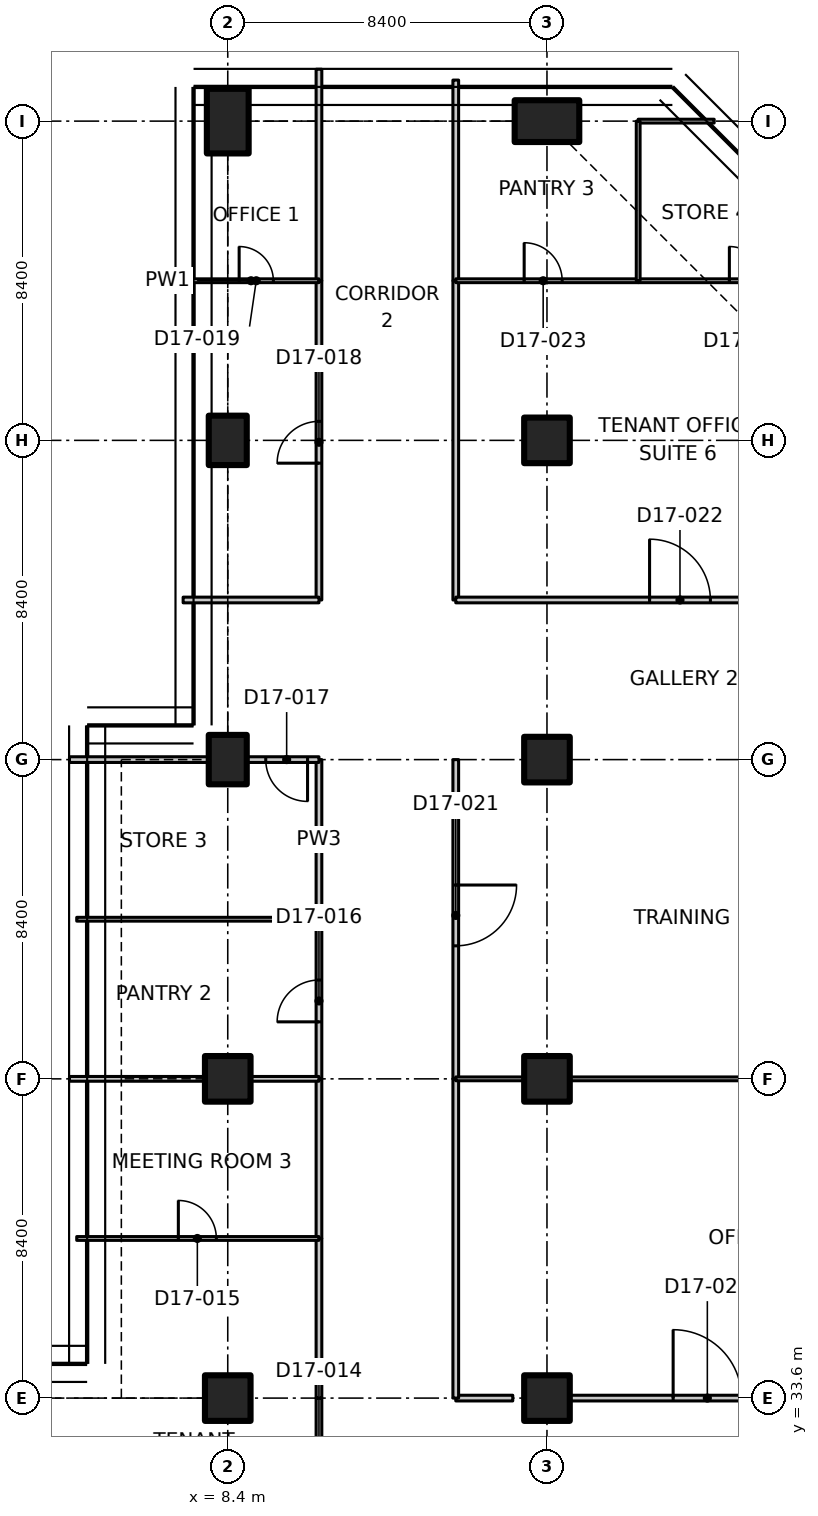
"""IFC4 building model, lengths in metres.
Left out: names, types, materials, properties, quantities, classifications, styles, units other than length and angle.
Written with IfcOpenShell. Run it as: python <this file> out.ifc"""

import sys

from ifc_helpers import new_model, si_unit, direction, frame, frame_2d, origin, origin_2d, place, context, subcontext, project, spatial, polyline, rectangle, outline, extrude, element, fill, save


model = new_model("IFC4")
c1 = context("Model", 3, precision=1e-05, world=origin(), true_north=direction((0.0, 1.0)))
c2 = subcontext(c1, "Body", "Model", "MODEL_VIEW")
j1 = project(units=[si_unit("LENGTHUNIT", "METRE"), si_unit("PLANEANGLEUNIT", "RADIAN")], contexts=[c1])
p1 = place(None, origin())
s1 = spatial("IfcSite", under=j1, at=p1, CompositionType="ELEMENT")
p2 = place(p1, origin())
s2 = spatial("IfcBuilding", under=s1, at=p2, CompositionType="ELEMENT")
p3 = place(p2, frame((0.0, 0.0, 142.1)))
s3 = spatial("IfcBuildingStorey", under=s2, at=p3, CompositionType="ELEMENT", Elevation=142.1)
for number, where, z_axis, x_axis in (
    (1, (8.4, 33.6, 0.0), (0.0, 0.0, 1.0), (1.0, 0.0, 0.0)),
    (2, (8.4, 42.0, 0.0), (0.0, 0.0, 1.0), (1.0, 0.0, 0.0)),
):
    element("IfcColumn", number, at=place(p3, frame(where, z_axis=z_axis, x_axis=x_axis)), inside=s3, PredefinedType="COLUMN", context=c2, shape_type="SweptSolid", body=[
        extrude(rectangle(XDim=1.2, YDim=1.2, at=origin_2d()), origin(), (0.0, 0.0, 1.0), 3.35),
    ])
for number, where, z_axis, x_axis in (
    (3, (8.4, 50.4, 0.0), (0.0, 0.0, 1.0), (1.0, 0.0, 0.0)),
    (4, (8.4, 58.8, 0.0), (0.0, 0.0, 1.0), (1.0, 0.0, 0.0)),
):
    element("IfcColumn", number, at=place(p3, frame(where, z_axis=z_axis, x_axis=x_axis)), inside=s3, PredefinedType="COLUMN", context=c2, shape_type="SweptSolid", body=[
        extrude(rectangle(XDim=1.0, YDim=1.3, at=origin_2d()), origin(), (0.0, 0.0, 1.0), 3.35),
    ])
p4 = place(p3, frame((8.4, 67.2, 0.0), z_axis=(0.0, 0.0, 1.0), x_axis=(1.0, 0.0, 0.0)))
e5 = element("IfcColumn", 5, at=p4, inside=s3, PredefinedType="COLUMN", context=c2, shape_type="SweptSolid", body=[
    extrude(rectangle(XDim=1.1, YDim=1.7, at=origin_2d()), origin(), (0.0, 0.0, 1.0), 3.35),
])
for number, where, z_axis, x_axis in (
    (6, (16.8, 33.6, 0.0), (0.0, 0.0, 1.0), (1.0, 0.0, 0.0)),
    (7, (16.8, 42.0, 0.0), (0.0, 0.0, 1.0), (1.0, 0.0, 0.0)),
    (8, (16.8, 50.4, 0.0), (0.0, 0.0, 1.0), (1.0, 0.0, 0.0)),
    (9, (16.8, 58.8, 0.0), (0.0, 0.0, 1.0), (1.0, 0.0, 0.0)),
):
    element("IfcColumn", number, at=place(p3, frame(where, z_axis=z_axis, x_axis=x_axis)), inside=s3, PredefinedType="COLUMN", context=c2, shape_type="SweptSolid", body=[
        extrude(rectangle(XDim=1.2, YDim=1.2, at=origin_2d()), origin(), (0.0, 0.0, 1.0), 3.35),
    ])
p5 = place(p3, frame((16.8, 67.2, 0.0), z_axis=(0.0, 0.0, 1.0), x_axis=(0.0, 1.0, 0.0)))
e10 = element("IfcColumn", 10, at=p5, inside=s3, PredefinedType="COLUMN", context=c2, shape_type="SweptSolid", body=[
    extrude(rectangle(XDim=1.1, YDim=1.7, at=origin_2d()), origin(), (0.0, 0.0, 1.0), 3.35),
])
p6 = place(p3, frame((10.8, 29.4, 0.0), z_axis=(0.0, 0.0, 1.0), x_axis=(0.0, 1.0, 0.0)))
e11 = element("IfcWall", 11, at=p6, inside=s3, PredefinedType="PARTITIONING", context=c2, shape_type="SweptSolid", body=[
    extrude(rectangle(XDim=4.2, YDim=0.15, at=frame_2d((2.1, 0.0))), origin(), (0.0, 0.0, 1.0), 3.33),
])
p7 = place(p6, frame((1.2, 0.0, 0.0)))
e12 = element("IfcOpeningElement", 12, at=p7, cuts=e11, PredefinedType="OPENING", context=c2, shape_type="SweptSolid", body=[
    extrude(rectangle(XDim=1.6, YDim=2.1, at=frame_2d((0.8, 1.05))), frame((0.0, 0.085, 0.0), z_axis=(0.0, -1.0, 0.0), x_axis=(1.0, 0.0, 0.0)), (0.0, 0.0, 1.0), 0.17),
])
p8 = place(p3, frame((14.4, 33.6, 0.0), z_axis=(0.0, 0.0, 1.0), x_axis=(1.0, 0.0, 0.0)))
e13 = element("IfcWall", 13, at=p8, inside=s3, PredefinedType="PARTITIONING", context=c2, shape_type="SweptSolid", body=[
    extrude(rectangle(XDim=1.5, YDim=0.15, at=frame_2d((0.75, 0.0))), origin(), (0.0, 0.0, 1.0), 3.33),
])
p9 = place(p3, frame((17.42, 33.6, 0.0), z_axis=(0.0, 0.0, 1.0), x_axis=(1.0, 0.0, 0.0)))
e14 = element("IfcWall", 14, at=p9, inside=s3, PredefinedType="PARTITIONING", context=c2, shape_type="SweptSolid", body=[
    extrude(rectangle(XDim=7.26, YDim=0.15, at=frame_2d((3.63, 0.0))), origin(), (0.0, 0.0, 1.0), 3.33),
])
p10 = place(p9, frame((2.7, 0.0, 0.0)))
e15 = element("IfcOpeningElement", 15, at=p10, cuts=e14, PredefinedType="OPENING", context=c2, shape_type="SweptSolid", body=[
    extrude(rectangle(XDim=1.8, YDim=2.1, at=frame_2d((0.9, 1.05))), frame((0.0, 0.085, 0.0), z_axis=(0.0, -1.0, 0.0), x_axis=(1.0, 0.0, 0.0)), (0.0, 0.0, 1.0), 0.17),
])
for number, where, z_axis, x_axis in (
    (16, (10.8, 33.6, 0.0), (0.0, 0.0, 1.0), (0.0, 1.0, 0.0)),
    (17, (10.8, 37.8, 0.0), (0.0, 0.0, 1.0), (0.0, 1.0, 0.0)),
):
    element("IfcWall", number, at=place(p3, frame(where, z_axis=z_axis, x_axis=x_axis)), inside=s3, PredefinedType="PARTITIONING", context=c2, shape_type="SweptSolid", body=[
        extrude(rectangle(XDim=4.2, YDim=0.15, at=frame_2d((2.1, 0.0))), origin(), (0.0, 0.0, 1.0), 3.33),
    ])
p11 = place(p3, frame((10.8, 42.0, 0.0), z_axis=(0.0, 0.0, 1.0), x_axis=(0.0, 1.0, 0.0)))
e18 = element("IfcWall", 18, at=p11, inside=s3, PredefinedType="PARTITIONING", context=c2, shape_type="SweptSolid", body=[
    extrude(rectangle(XDim=4.2, YDim=0.15, at=frame_2d((2.1, 0.0))), origin(), (0.0, 0.0, 1.0), 3.33),
])
p12 = place(p11, frame((1.5, 0.0, 0.0)))
e19 = element("IfcOpeningElement", 19, at=p12, cuts=e18, PredefinedType="OPENING", context=c2, shape_type="SweptSolid", body=[
    extrude(rectangle(XDim=1.1, YDim=2.1, at=frame_2d((0.55, 1.05))), frame((0.0, 0.085, 0.0), z_axis=(0.0, -1.0, 0.0), x_axis=(1.0, 0.0, 0.0)), (0.0, 0.0, 1.0), 0.17),
])
p13 = place(p3, frame((10.8, 46.2, 0.0), z_axis=(0.0, 0.0, 1.0), x_axis=(0.0, 1.0, 0.0)))
e20 = element("IfcWall", 20, at=p13, inside=s3, PredefinedType="PARTITIONING", context=c2, shape_type="SweptSolid", body=[
    extrude(rectangle(XDim=4.2, YDim=0.15, at=frame_2d((2.1, 0.0))), origin(), (0.0, 0.0, 1.0), 3.33),
])
p14 = place(p3, frame((10.8, 54.6, 0.0), z_axis=(0.0, 0.0, 1.0), x_axis=(0.0, 1.0, 0.0)))
e21 = element("IfcWall", 21, at=p14, inside=s3, PredefinedType="PARTITIONING", context=c2, shape_type="SweptSolid", body=[
    extrude(rectangle(XDim=8.4, YDim=0.15, at=frame_2d((4.2, 0.0))), origin(), (0.0, 0.0, 1.0), 3.33),
])
p15 = place(p14, frame((3.6, 0.0, 0.0)))
e22 = element("IfcOpeningElement", 22, at=p15, cuts=e21, PredefinedType="OPENING", context=c2, shape_type="SweptSolid", body=[
    extrude(rectangle(XDim=1.1, YDim=2.1, at=frame_2d((0.55, 1.05))), frame((0.0, 0.085, 0.0), z_axis=(0.0, -1.0, 0.0), x_axis=(1.0, 0.0, 0.0)), (0.0, 0.0, 1.0), 0.17),
])
p16 = place(p3, frame((10.8, 63.0, 0.0), z_axis=(0.0, 0.0, 1.0), x_axis=(0.0, 1.0, 0.0)))
e23 = element("IfcWall", 23, at=p16, inside=s3, PredefinedType="PARTITIONING", context=c2, shape_type="SweptSolid", body=[
    extrude(outline(polyline([(0.0, 0.0), (5.565, 0.0), (5.565, 3.33), (5.28, 3.33), (4.65, 3.33), (4.648, 2.98), (3.752, 2.98), (3.75, 3.33), (0.0, 3.33), (0.0, 0.0)])), frame((0.0, 0.075, 0.0), z_axis=(0.0, -1.0, 0.0), x_axis=(1.0, 0.0, 0.0)), (0.0, 0.0, 1.0), 0.15),
])
p17 = place(p3, frame((14.4, 42.0, 0.0), z_axis=(0.0, 0.0, 1.0), x_axis=(0.0, -1.0, 0.0)))
e24 = element("IfcWall", 24, at=p17, inside=s3, PredefinedType="PARTITIONING", context=c2, shape_type="SweptSolid", body=[
    extrude(rectangle(XDim=8.4, YDim=0.15, at=frame_2d((4.2, 0.0))), origin(), (0.0, 0.0, 1.0), 3.33),
])
p18 = place(p3, frame((14.4, 50.4, 0.0), z_axis=(0.0, 0.0, 1.0), x_axis=(0.0, -1.0, 0.0)))
e25 = element("IfcWall", 25, at=p18, inside=s3, PredefinedType="PARTITIONING", context=c2, shape_type="SweptSolid", body=[
    extrude(rectangle(XDim=8.4, YDim=0.15, at=frame_2d((4.2, 0.0))), origin(), (0.0, 0.0, 1.0), 3.33),
])
p19 = place(p18, frame((3.3, 0.0, 0.0)))
e26 = element("IfcOpeningElement", 26, at=p19, cuts=e25, PredefinedType="OPENING", context=c2, shape_type="SweptSolid", body=[
    extrude(rectangle(XDim=1.6, YDim=2.1, at=frame_2d((0.8, 1.05))), frame((0.0, 0.085, 0.0), z_axis=(0.0, -1.0, 0.0), x_axis=(1.0, 0.0, 0.0)), (0.0, 0.0, 1.0), 0.17),
])
p20 = place(p3, frame((14.4, 63.0, 0.0), z_axis=(0.0, 0.0, 1.0), x_axis=(0.0, -1.0, 0.0)))
e27 = element("IfcWall", 27, at=p20, inside=s3, PredefinedType="PARTITIONING", context=c2, shape_type="SweptSolid", body=[
    extrude(rectangle(XDim=8.4, YDim=0.15, at=frame_2d((4.2, 0.0))), origin(), (0.0, 0.0, 1.0), 3.33),
])
p21 = place(p3, frame((14.4, 68.28, 0.0), z_axis=(0.0, 0.0, 1.0), x_axis=(0.0, -1.0, 0.0)))
e28 = element("IfcWall", 28, at=p21, inside=s3, PredefinedType="PARTITIONING", context=c2, shape_type="SweptSolid", body=[
    extrude(outline(polyline([(0.0, 0.0), (5.28, 0.0), (5.28, 3.33), (1.53, 3.33), (1.528, 2.98), (0.632, 2.98), (0.63, 3.33), (0.0, 3.33), (0.0, 0.0)])), frame((0.0, 0.075, 0.0), z_axis=(0.0, -1.0, 0.0), x_axis=(1.0, 0.0, 0.0)), (0.0, 0.0, 1.0), 0.15),
])
p22 = place(p3, frame((10.8, 50.4, 0.0), z_axis=(0.0, 0.0, 1.0), x_axis=(-1.0, 0.0, 0.0)))
e29 = element("IfcWall", 29, at=p22, inside=s3, PredefinedType="PARTITIONING", context=c2, shape_type="SweptSolid", body=[
    extrude(rectangle(XDim=1.88, YDim=0.15, at=frame_2d((0.94, 0.0))), origin(), (0.0, 0.0, 1.0), 3.33),
])
p23 = place(p22, frame((0.3, 0.0, 0.0)))
e30 = element("IfcOpeningElement", 30, at=p23, cuts=e29, PredefinedType="OPENING", context=c2, shape_type="SweptSolid", body=[
    extrude(rectangle(XDim=1.1, YDim=2.1, at=frame_2d((0.55, 1.05))), frame((0.0, 0.085, 0.0), z_axis=(0.0, -1.0, 0.0), x_axis=(1.0, 0.0, 0.0)), (0.0, 0.0, 1.0), 0.17),
])
p24 = place(p3, frame((7.88, 50.4, 0.0), z_axis=(0.0, 0.0, 1.0), x_axis=(-1.0, 0.0, 0.0)))
e31 = element("IfcWall", 31, at=p24, inside=s3, PredefinedType="PARTITIONING", context=c2, shape_type="SweptSolid", body=[
    extrude(rectangle(XDim=3.645, YDim=0.15, at=frame_2d((1.822, 0.0))), origin(), (0.0, 0.0, 1.0), 2.98),
])
p25 = place(p3, frame((7.226, 54.6, 0.0), z_axis=(0.0, 0.0, 1.0), x_axis=(1.0, 0.0, 0.0)))
e32 = element("IfcWall", 32, at=p25, inside=s3, PredefinedType="PARTITIONING", context=c2, shape_type="SweptSolid", body=[
    extrude(rectangle(XDim=3.574, YDim=0.15, at=frame_2d((1.787, 0.0))), origin(), (0.0, 0.0, 1.0), 2.98),
])
p26 = place(p3, frame((4.426, 37.8, 0.0), z_axis=(0.0, 0.0, 1.0), x_axis=(1.0, 0.0, 0.0)))
e33 = element("IfcWall", 33, at=p26, inside=s3, PredefinedType="PARTITIONING", context=c2, shape_type="SweptSolid", body=[
    extrude(outline(polyline([(0.0, 0.0), (6.374, 0.0), (6.374, 3.33), (1.624, 3.33), (1.622, 2.98), (0.726, 2.98), (0.724, 3.33), (0.074, 3.33), (0.0, 3.33), (0.0, 0.0)])), frame((0.0, 0.05, 0.0), z_axis=(0.0, -1.0, 0.0), x_axis=(1.0, 0.0, 0.0)), (0.0, 0.0, 1.0), 0.1),
])
p27 = place(p26, frame((2.674, 0.0, 0.0)))
e34 = element("IfcOpeningElement", 34, at=p27, cuts=e33, PredefinedType="OPENING", context=c2, shape_type="SweptSolid", body=[
    extrude(rectangle(XDim=1.0, YDim=2.1, at=frame_2d((0.5, 1.05))), frame((0.0, 0.06, 0.0), z_axis=(0.0, -1.0, 0.0), x_axis=(1.0, 0.0, 0.0)), (0.0, 0.0, 1.0), 0.12),
])
p28 = place(p3, frame((4.235, 42.0, 0.0), z_axis=(0.0, 0.0, 1.0), x_axis=(1.0, 0.0, 0.0)))
e35 = element("IfcWall", 35, at=p28, inside=s3, PredefinedType="PARTITIONING", context=c2, shape_type="SweptSolid", body=[
    extrude(rectangle(XDim=3.545, YDim=0.125, at=frame_2d((1.772, 0.0))), origin(), (0.0, 0.0, 1.0), 2.98),
])
p29 = place(p3, frame((9.02, 42.0, 0.0), z_axis=(0.0, 0.0, 1.0), x_axis=(1.0, 0.0, 0.0)))
e36 = element("IfcWall", 36, at=p29, inside=s3, PredefinedType="PARTITIONING", context=c2, shape_type="SweptSolid", body=[
    extrude(rectangle(XDim=1.78, YDim=0.125, at=frame_2d((0.89, 0.0))), origin(), (0.0, 0.0, 1.0), 3.33),
])
p30 = place(p3, frame((4.426, 46.2, 0.0), z_axis=(0.0, 0.0, 1.0), x_axis=(1.0, 0.0, 0.0)))
e37 = element("IfcWall", 37, at=p30, inside=s3, PredefinedType="PARTITIONING", context=c2, shape_type="SweptSolid", body=[
    extrude(outline(polyline([(0.0, 0.0), (6.374, 0.0), (6.374, 3.33), (1.624, 3.33), (1.622, 2.98), (0.726, 2.98), (0.724, 3.33), (0.074, 3.33), (0.0, 3.33), (0.0, 0.0)])), frame((0.0, 0.05, 0.0), z_axis=(0.0, -1.0, 0.0), x_axis=(1.0, 0.0, 0.0)), (0.0, 0.0, 1.0), 0.1),
])
p31 = place(p3, frame((7.226, 63.0, 0.0), z_axis=(0.0, 0.0, 1.0), x_axis=(1.0, 0.0, 0.0)))
e38 = element("IfcWall", 38, at=p31, inside=s3, PredefinedType="PARTITIONING", context=c2, shape_type="SweptSolid", body=[
    extrude(rectangle(XDim=3.574, YDim=0.1, at=frame_2d((1.787, 0.0))), origin(), (0.0, 0.0, 1.0), 2.98),
])
p32 = place(p31, frame((1.474, 0.0, 0.0)))
e39 = element("IfcOpeningElement", 39, at=p32, cuts=e38, PredefinedType="OPENING", context=c2, shape_type="SweptSolid", body=[
    extrude(rectangle(XDim=0.9, YDim=2.1, at=frame_2d((0.45, 1.05))), frame((0.0, 0.06, 0.0), z_axis=(0.0, -1.0, 0.0), x_axis=(1.0, 0.0, 0.0)), (0.0, 0.0, 1.0), 0.12),
])
p33 = place(p3, frame((14.4, 54.6, 0.0), z_axis=(0.0, 0.0, 1.0), x_axis=(1.0, 0.0, 0.0)))
e40 = element("IfcWall", 40, at=p33, inside=s3, PredefinedType="PARTITIONING", context=c2, shape_type="SweptSolid", body=[
    extrude(outline(polyline([(0.0, 0.0), (12.165, 0.0), (12.165, 3.33), (11.9, 3.33), (11.25, 3.33), (11.248, 2.98), (10.352, 2.98), (10.35, 3.33), (0.0, 3.33), (0.0, 0.0)])), frame((0.0, 0.075, 0.0), z_axis=(0.0, -1.0, 0.0), x_axis=(1.0, 0.0, 0.0)), (0.0, 0.0, 1.0), 0.15),
])
p34 = place(p33, frame((5.1, 0.0, 0.0)))
e41 = element("IfcOpeningElement", 41, at=p34, cuts=e40, PredefinedType="OPENING", context=c2, shape_type="SweptSolid", body=[
    extrude(rectangle(XDim=1.6, YDim=2.1, at=frame_2d((0.8, 1.05))), frame((0.0, 0.085, 0.0), z_axis=(0.0, -1.0, 0.0), x_axis=(1.0, 0.0, 0.0)), (0.0, 0.0, 1.0), 0.17),
])
p35 = place(p3, frame((14.4, 42.0, 0.0), z_axis=(0.0, 0.0, 1.0), x_axis=(1.0, 0.0, 0.0)))
e42 = element("IfcWall", 42, at=p35, inside=s3, PredefinedType="PARTITIONING", context=c2, shape_type="SweptSolid", body=[
    extrude(rectangle(XDim=1.78, YDim=0.1, at=frame_2d((0.89, 0.0))), origin(), (0.0, 0.0, 1.0), 3.33),
])
p36 = place(p3, frame((17.42, 42.0, 0.0), z_axis=(0.0, 0.0, 1.0), x_axis=(1.0, 0.0, 0.0)))
e43 = element("IfcWall", 43, at=p36, inside=s3, PredefinedType="PARTITIONING", context=c2, shape_type="SweptSolid", body=[
    extrude(rectangle(XDim=7.26, YDim=0.1, at=frame_2d((3.63, 0.0))), origin(), (0.0, 0.0, 1.0), 3.33),
])
p37 = place(p3, frame((14.4, 63.0, 0.0), z_axis=(0.0, 0.0, 1.0), x_axis=(1.0, 0.0, 0.0)))
e44 = element("IfcWall", 44, at=p37, inside=s3, PredefinedType="PARTITIONING", context=c2, shape_type="SweptSolid", body=[
    extrude(rectangle(XDim=4.8, YDim=0.1, at=frame_2d((2.4, 0.0))), origin(), (0.0, 0.0, 1.0), 3.33),
])
p38 = place(p37, frame((1.8, 0.0, 0.0)))
e45 = element("IfcOpeningElement", 45, at=p38, cuts=e44, PredefinedType="OPENING", context=c2, shape_type="SweptSolid", body=[
    extrude(rectangle(XDim=1.0, YDim=2.1, at=frame_2d((0.5, 1.05))), frame((0.0, 0.06, 0.0), z_axis=(0.0, -1.0, 0.0), x_axis=(1.0, 0.0, 0.0)), (0.0, 0.0, 1.0), 0.12),
])
p39 = place(p3, frame((19.2, 63.0, 0.0), z_axis=(0.0, 0.0, 1.0), x_axis=(1.0, 0.0, 0.0)))
e46 = element("IfcWall", 46, at=p39, inside=s3, PredefinedType="PARTITIONING", context=c2, shape_type="SweptSolid", body=[
    extrude(outline(polyline([(0.0, 0.0), (6.2, 0.0), (6.2, 3.33), (2.466, 3.33), (2.464, 2.98), (1.136, 2.98), (1.134, 3.33), (0.0, 3.33), (0.0, 0.0)])), frame((0.0, 0.05, 0.0), z_axis=(0.0, -1.0, 0.0), x_axis=(1.0, 0.0, 0.0)), (0.0, 0.0, 1.0), 0.1),
])
p40 = place(p39, frame((2.4, 0.0, 0.0)))
e47 = element("IfcOpeningElement", 47, at=p40, cuts=e46, PredefinedType="OPENING", context=c2, shape_type="SweptSolid", body=[
    extrude(rectangle(XDim=0.9, YDim=2.1, at=frame_2d((0.45, 1.05))), frame((0.0, 0.06, 0.0), z_axis=(0.0, -1.0, 0.0), x_axis=(1.0, 0.0, 0.0)), (0.0, 0.0, 1.0), 0.12),
])
p41 = place(p3, frame((21.2, 67.2, 0.0), z_axis=(0.0, 0.0, 1.0), x_axis=(-1.0, 0.0, 0.0)))
e48 = element("IfcWall", 48, at=p41, inside=s3, PredefinedType="PARTITIONING", context=c2, shape_type="SweptSolid", body=[
    extrude(rectangle(XDim=2.0, YDim=0.1, at=frame_2d((1.0, 0.0))), origin(), (0.0, 0.0, 1.0), 3.33),
])
p42 = place(p3, frame((19.2, 67.2, 0.0), z_axis=(0.0, 0.0, 1.0), x_axis=(0.0, -1.0, 0.0)))
e49 = element("IfcWall", 49, at=p42, inside=s3, PredefinedType="PARTITIONING", context=c2, shape_type="SweptSolid", body=[
    extrude(rectangle(XDim=4.2, YDim=0.1, at=frame_2d((2.1, 0.0))), origin(), (0.0, 0.0, 1.0), 2.98),
])
p43 = place(p27, origin())
e50 = element("IfcDoor", 50, at=p43, inside=s3, OperationType="SINGLE_SWING_LEFT", PredefinedType="DOOR", context=c2, shape_type="SweptSolid", body=[
    extrude(rectangle(XDim=1.0, YDim=2.1, at=frame_2d((0.5, 1.05))), frame((0.0, 0.025, 0.0), z_axis=(0.0, -1.0, 0.0), x_axis=(1.0, 0.0, 0.0)), (0.0, 0.0, 1.0), 0.05),
])
fill(e34, e50)
p44 = place(p12, origin())
e51 = element("IfcDoor", 51, at=p44, inside=s3, OperationType="SINGLE_SWING_LEFT", PredefinedType="DOOR", context=c2, shape_type="SweptSolid", body=[
    extrude(rectangle(XDim=1.1, YDim=2.1, at=frame_2d((0.55, 1.05))), frame((0.0, 0.025, 0.0), z_axis=(0.0, -1.0, 0.0), x_axis=(1.0, 0.0, 0.0)), (0.0, 0.0, 1.0), 0.05),
])
fill(e19, e51)
p45 = place(p23, origin())
e52 = element("IfcDoor", 52, at=p45, inside=s3, OperationType="SINGLE_SWING_LEFT", PredefinedType="DOOR", context=c2, shape_type="SweptSolid", body=[
    extrude(rectangle(XDim=1.1, YDim=2.1, at=frame_2d((0.55, 1.05))), frame((0.0, 0.025, 0.0), z_axis=(0.0, -1.0, 0.0), x_axis=(1.0, 0.0, 0.0)), (0.0, 0.0, 1.0), 0.05),
])
fill(e30, e52)
p46 = place(p15, origin())
e53 = element("IfcDoor", 53, at=p46, inside=s3, OperationType="SINGLE_SWING_LEFT", PredefinedType="DOOR", context=c2, shape_type="SweptSolid", body=[
    extrude(rectangle(XDim=1.1, YDim=2.1, at=frame_2d((0.55, 1.05))), frame((0.0, 0.025, 0.0), z_axis=(0.0, -1.0, 0.0), x_axis=(1.0, 0.0, 0.0)), (0.0, 0.0, 1.0), 0.05),
])
fill(e22, e53)
p47 = place(p32, origin())
e54 = element("IfcDoor", 54, at=p47, inside=s3, OperationType="SINGLE_SWING_LEFT", PredefinedType="DOOR", context=c2, shape_type="SweptSolid", body=[
    extrude(rectangle(XDim=0.9, YDim=2.1, at=frame_2d((0.45, 1.05))), frame((0.0, 0.025, 0.0), z_axis=(0.0, -1.0, 0.0), x_axis=(1.0, 0.0, 0.0)), (0.0, 0.0, 1.0), 0.05),
])
fill(e39, e54)
p48 = place(p10, origin())
e55 = element("IfcDoor", 55, at=p48, inside=s3, OperationType="DOUBLE_DOOR_SINGLE_SWING", PredefinedType="DOOR", context=c2, shape_type="SweptSolid", body=[
    extrude(rectangle(XDim=1.8, YDim=2.1, at=frame_2d((0.9, 1.05))), frame((0.0, 0.025, 0.0), z_axis=(0.0, -1.0, 0.0), x_axis=(1.0, 0.0, 0.0)), (0.0, 0.0, 1.0), 0.05),
])
fill(e15, e55)
p49 = place(p19, origin())
e56 = element("IfcDoor", 56, at=p49, inside=s3, OperationType="DOUBLE_DOOR_SINGLE_SWING", PredefinedType="DOOR", context=c2, shape_type="SweptSolid", body=[
    extrude(rectangle(XDim=1.6, YDim=2.1, at=frame_2d((0.8, 1.05))), frame((0.0, 0.025, 0.0), z_axis=(0.0, -1.0, 0.0), x_axis=(1.0, 0.0, 0.0)), (0.0, 0.0, 1.0), 0.05),
])
fill(e26, e56)
p50 = place(p34, origin())
e57 = element("IfcDoor", 57, at=p50, inside=s3, OperationType="DOUBLE_DOOR_SINGLE_SWING", PredefinedType="DOOR", context=c2, shape_type="SweptSolid", body=[
    extrude(rectangle(XDim=1.6, YDim=2.1, at=frame_2d((0.8, 1.05))), frame((0.0, 0.025, 0.0), z_axis=(0.0, -1.0, 0.0), x_axis=(1.0, 0.0, 0.0)), (0.0, 0.0, 1.0), 0.05),
])
fill(e41, e57)
p51 = place(p38, origin())
e58 = element("IfcDoor", 58, at=p51, inside=s3, OperationType="SINGLE_SWING_LEFT", PredefinedType="DOOR", context=c2, shape_type="SweptSolid", body=[
    extrude(rectangle(XDim=1.0, YDim=2.1, at=frame_2d((0.5, 1.05))), frame((0.0, 0.025, 0.0), z_axis=(0.0, -1.0, 0.0), x_axis=(1.0, 0.0, 0.0)), (0.0, 0.0, 1.0), 0.05),
])
fill(e45, e58)
p52 = place(p40, origin())
e59 = element("IfcDoor", 59, at=p52, inside=s3, OperationType="SINGLE_SWING_LEFT", PredefinedType="DOOR", context=c2, shape_type="SweptSolid", body=[
    extrude(rectangle(XDim=0.9, YDim=2.1, at=frame_2d((0.45, 1.05))), frame((0.0, 0.025, 0.0), z_axis=(0.0, -1.0, 0.0), x_axis=(1.0, 0.0, 0.0)), (0.0, 0.0, 1.0), 0.05),
])
fill(e47, e59)
save(model, sys.argv[1])
